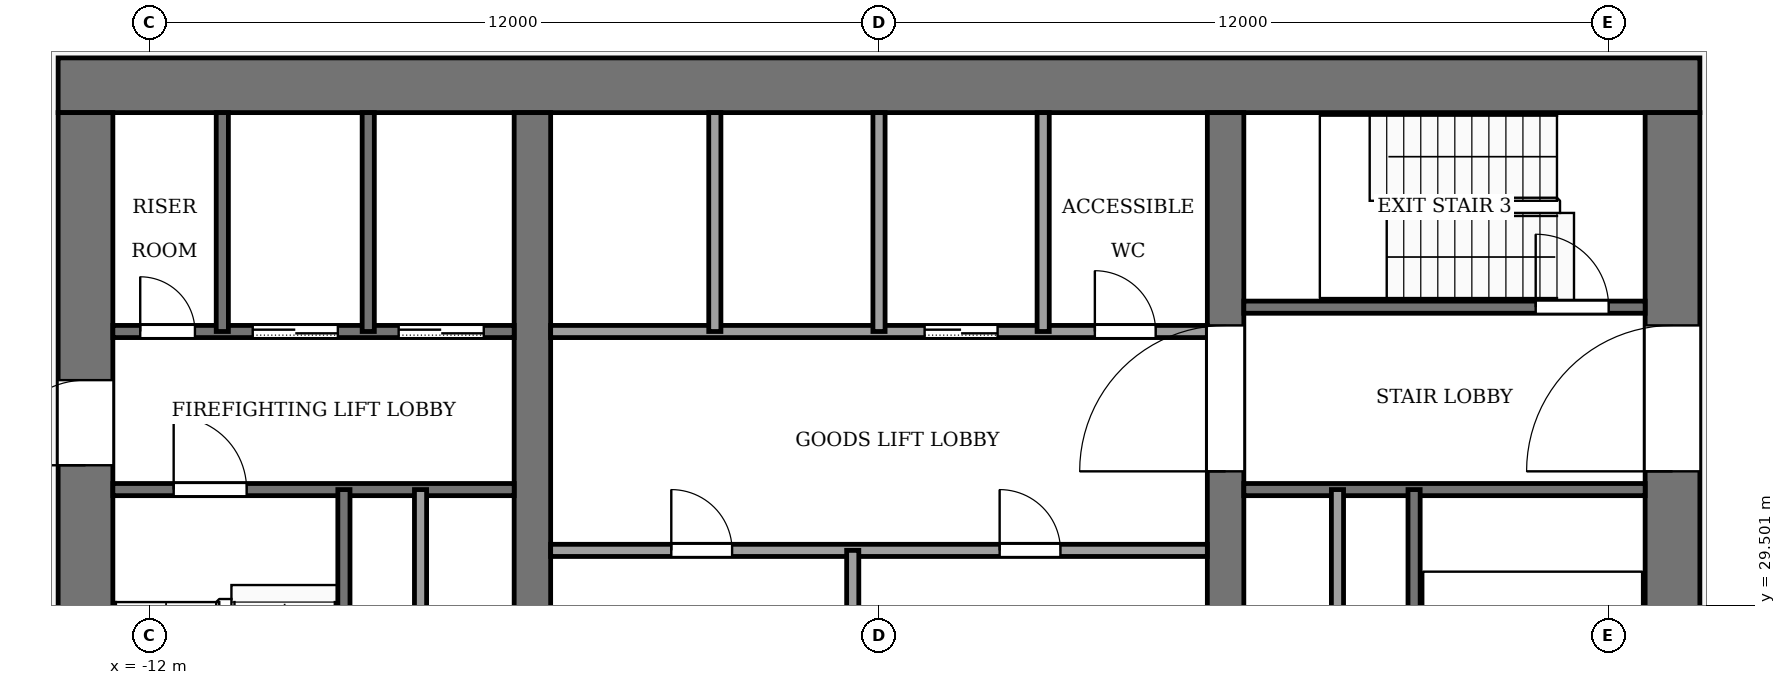
"""IFC4 building model, lengths in metres.
Left out: names, types, materials, properties, quantities, classifications, styles, units other than length and angle.
Written with IfcOpenShell. Run it as: python <this file> out.ifc"""

import sys

from ifc_helpers import new_model, si_unit, direction, frame, frame_2d, origin, place, context, subcontext, project, spatial, rectangle, extrude, element, fill, save


model = new_model("IFC4")
c1 = context("Model", 3, precision=1e-05, world=origin(), true_north=direction((0.0, 1.0)))
c2 = subcontext(c1, "Body", "Model", "MODEL_VIEW")
j1 = project(units=[si_unit("LENGTHUNIT", "METRE"), si_unit("PLANEANGLEUNIT", "RADIAN")], contexts=[c1])
p1 = place(None, origin())
s1 = spatial("IfcSite", under=j1, at=p1, CompositionType="ELEMENT")
p2 = place(p1, origin())
s2 = spatial("IfcBuilding", under=s1, at=p2, CompositionType="ELEMENT")
p3 = place(p2, frame((0.0, 0.0, 206.0)))
s3 = spatial("IfcBuildingStorey", under=s2, at=p3, CompositionType="ELEMENT", Elevation=206.0)
p4 = place(p3, frame((-13.5, 38.05, -0.13), z_axis=(0.0, 0.0, 1.0), x_axis=(1.0, 0.0, 0.0)))
e1 = element("IfcWall", 1, at=p4, inside=s3, PredefinedType="SHEAR", context=c2, shape_type="SweptSolid", body=[
    extrude(rectangle(XDim=27.0, YDim=0.9, at=frame_2d((13.5, 0.0))), origin(), (0.0, 0.0, 1.0), 4.0),
])
p5 = place(p3, frame((-13.05, 18.4, -0.13), z_axis=(0.0, 0.0, 1.0), x_axis=(0.0, 1.0, 0.0)))
e2 = element("IfcWall", 2, at=p5, inside=s3, PredefinedType="SHEAR", context=c2, shape_type="SweptSolid", body=[
    extrude(rectangle(XDim=19.2, YDim=0.9, at=frame_2d((9.6, 0.0))), origin(), (0.0, 0.0, 1.0), 4.0),
])
p6 = place(p5, frame((2.8, 0.0, 0.13)))
e3 = element("IfcOpeningElement", 3, at=p6, cuts=e2, PredefinedType="OPENING", context=c2, shape_type="SweptSolid", body=[
    extrude(rectangle(XDim=2.4, YDim=2.4, at=frame_2d((1.2, 1.2))), frame((0.0, 0.46, 0.0), z_axis=(0.0, -1.0, 0.0), x_axis=(1.0, 0.0, 0.0)), (0.0, 0.0, 1.0), 0.92),
])
p7 = place(p5, frame((13.4, 0.0, 0.13)))
e4 = element("IfcOpeningElement", 4, at=p7, cuts=e2, PredefinedType="OPENING", context=c2, shape_type="SweptSolid", body=[
    extrude(rectangle(XDim=1.4, YDim=2.2, at=frame_2d((0.7, 1.1))), frame((0.0, 0.46, 0.0), z_axis=(0.0, -1.0, 0.0), x_axis=(1.0, 0.0, 0.0)), (0.0, 0.0, 1.0), 0.92),
])
p8 = place(p3, frame((13.05, 18.4, -0.13), z_axis=(0.0, 0.0, 1.0), x_axis=(0.0, 1.0, 0.0)))
e5 = element("IfcWall", 5, at=p8, inside=s3, PredefinedType="SHEAR", context=c2, shape_type="SweptSolid", body=[
    extrude(rectangle(XDim=19.2, YDim=0.9, at=frame_2d((9.6, 0.0))), origin(), (0.0, 0.0, 1.0), 4.0),
])
p9 = place(p8, frame((2.8, 0.0, 0.13)))
e6 = element("IfcOpeningElement", 6, at=p9, cuts=e5, PredefinedType="OPENING", context=c2, shape_type="SweptSolid", body=[
    extrude(rectangle(XDim=2.4, YDim=2.4, at=frame_2d((1.2, 1.2))), frame((0.0, 0.46, 0.0), z_axis=(0.0, -1.0, 0.0), x_axis=(1.0, 0.0, 0.0)), (0.0, 0.0, 1.0), 0.92),
])
p10 = place(p8, frame((13.3, 0.0, 0.13)))
e7 = element("IfcOpeningElement", 7, at=p10, cuts=e5, PredefinedType="OPENING", context=c2, shape_type="SweptSolid", body=[
    extrude(rectangle(XDim=2.4, YDim=2.4, at=frame_2d((1.2, 1.2))), frame((0.0, 0.46, 0.0), z_axis=(0.0, -1.0, 0.0), x_axis=(1.0, 0.0, 0.0)), (0.0, 0.0, 1.0), 0.92),
])
p11 = place(p3, frame((-5.7, 18.4, -0.13), z_axis=(0.0, 0.0, 1.0), x_axis=(0.0, 1.0, 0.0)))
e8 = element("IfcWall", 8, at=p11, inside=s3, PredefinedType="SHEAR", context=c2, shape_type="SweptSolid", body=[
    extrude(rectangle(XDim=19.2, YDim=0.6, at=frame_2d((9.6, 0.0))), origin(), (0.0, 0.0, 1.0), 4.0),
])
p12 = place(p11, frame((8.35, 0.0, 0.13)))
e9 = element("IfcOpeningElement", 9, at=p12, cuts=e8, PredefinedType="OPENING", context=c2, shape_type="SweptSolid", body=[
    extrude(rectangle(XDim=0.9, YDim=2.1, at=frame_2d((0.45, 1.05))), frame((0.0, 0.31, 0.0), z_axis=(0.0, -1.0, 0.0), x_axis=(1.0, 0.0, 0.0)), (0.0, 0.0, 1.0), 0.62),
])
p13 = place(p3, frame((5.7, 18.4, -0.13), z_axis=(0.0, 0.0, 1.0), x_axis=(0.0, 1.0, 0.0)))
e10 = element("IfcWall", 10, at=p13, inside=s3, PredefinedType="SHEAR", context=c2, shape_type="SweptSolid", body=[
    extrude(rectangle(XDim=19.2, YDim=0.6, at=frame_2d((9.6, 0.0))), origin(), (0.0, 0.0, 1.0), 4.0),
])
p14 = place(p13, frame((8.35, 0.0, 0.13)))
e11 = element("IfcOpeningElement", 11, at=p14, cuts=e10, PredefinedType="OPENING", context=c2, shape_type="SweptSolid", body=[
    extrude(rectangle(XDim=0.9, YDim=2.1, at=frame_2d((0.45, 1.05))), frame((0.0, 0.31, 0.0), z_axis=(0.0, -1.0, 0.0), x_axis=(1.0, 0.0, 0.0)), (0.0, 0.0, 1.0), 0.62),
])
p15 = place(p13, frame((13.3, 0.0, 0.13)))
e12 = element("IfcOpeningElement", 12, at=p15, cuts=e10, PredefinedType="OPENING", context=c2, shape_type="SweptSolid", body=[
    extrude(rectangle(XDim=2.4, YDim=2.4, at=frame_2d((1.2, 1.2))), frame((0.0, 0.31, 0.0), z_axis=(0.0, -1.0, 0.0), x_axis=(1.0, 0.0, 0.0)), (0.0, 0.0, 1.0), 0.62),
])
p16 = place(p3, frame((-5.4, 30.4, 0.0), z_axis=(0.0, 0.0, 1.0), x_axis=(1.0, 0.0, 0.0)))
e13 = element("IfcWall", 13, at=p16, inside=s3, PredefinedType="PARTITIONING", context=c2, shape_type="SweptSolid", body=[
    extrude(rectangle(XDim=10.8, YDim=0.2, at=frame_2d((5.4, 0.0))), origin(), (0.0, 0.0, 1.0), 3.87),
])
p17 = place(p16, frame((1.984, 0.0, 0.0)))
e14 = element("IfcOpeningElement", 14, at=p17, cuts=e13, PredefinedType="OPENING", context=c2, shape_type="SweptSolid", body=[
    extrude(rectangle(XDim=1.0, YDim=2.1, at=frame_2d((0.5, 1.05))), frame((0.0, 0.11, 0.0), z_axis=(0.0, -1.0, 0.0), x_axis=(1.0, 0.0, 0.0)), (0.0, 0.0, 1.0), 0.22),
])
p18 = place(p16, frame((7.384, 0.0, 0.0)))
e15 = element("IfcOpeningElement", 15, at=p18, cuts=e13, PredefinedType="OPENING", context=c2, shape_type="SweptSolid", body=[
    extrude(rectangle(XDim=1.0, YDim=2.1, at=frame_2d((0.5, 1.05))), frame((0.0, 0.11, 0.0), z_axis=(0.0, -1.0, 0.0), x_axis=(1.0, 0.0, 0.0)), (0.0, 0.0, 1.0), 0.22),
])
p19 = place(p3, frame((-12.6, 31.4, 0.0), z_axis=(0.0, 0.0, 1.0), x_axis=(1.0, 0.0, 0.0)))
e16 = element("IfcWall", 16, at=p19, inside=s3, PredefinedType="PARTITIONING", context=c2, shape_type="SweptSolid", body=[
    extrude(rectangle(XDim=6.6, YDim=0.2, at=frame_2d((3.3, 0.0))), origin(), (0.0, 0.0, 1.0), 3.87),
])
p20 = place(p19, frame((1.0, 0.0, 0.0)))
e17 = element("IfcOpeningElement", 17, at=p20, cuts=e16, PredefinedType="OPENING", context=c2, shape_type="SweptSolid", body=[
    extrude(rectangle(XDim=1.2, YDim=2.2, at=frame_2d((0.6, 1.1))), frame((0.0, 0.11, 0.0), z_axis=(0.0, -1.0, 0.0), x_axis=(1.0, 0.0, 0.0)), (0.0, 0.0, 1.0), 0.22),
])
p21 = place(p3, frame((6.0, 31.4, 0.0), z_axis=(0.0, 0.0, 1.0), x_axis=(1.0, 0.0, 0.0)))
e18 = element("IfcWall", 18, at=p21, inside=s3, PredefinedType="PARTITIONING", context=c2, shape_type="SweptSolid", body=[
    extrude(rectangle(XDim=6.6, YDim=0.2, at=frame_2d((3.3, 0.0))), origin(), (0.0, 0.0, 1.0), 3.87),
])
p22 = place(p3, frame((-12.6, 34.0, 0.0), z_axis=(0.0, 0.0, 1.0), x_axis=(1.0, 0.0, 0.0)))
e19 = element("IfcWall", 19, at=p22, inside=s3, PredefinedType="PARTITIONING", context=c2, shape_type="SweptSolid", body=[
    extrude(rectangle(XDim=6.6, YDim=0.2, at=frame_2d((3.3, 0.0))), origin(), (0.0, 0.0, 1.0), 3.87),
])
p23 = place(p22, frame((4.7, 0.0, 0.0)))
e20 = element("IfcOpeningElement", 20, at=p23, cuts=e19, PredefinedType="OPENING", context=c2, shape_type="SweptSolid", body=[
    extrude(rectangle(XDim=1.4, YDim=2.2, at=frame_2d((0.7, 1.1))), frame((0.0, 0.11, 0.0), z_axis=(0.0, -1.0, 0.0), x_axis=(1.0, 0.0, 0.0)), (0.0, 0.0, 1.0), 0.22),
])
p24 = place(p22, frame((2.3, 0.0, 0.0)))
e21 = element("IfcOpeningElement", 21, at=p24, cuts=e19, PredefinedType="OPENING", context=c2, shape_type="SweptSolid", body=[
    extrude(rectangle(XDim=1.4, YDim=2.2, at=frame_2d((0.7, 1.1))), frame((0.0, 0.11, 0.0), z_axis=(0.0, -1.0, 0.0), x_axis=(1.0, 0.0, 0.0)), (0.0, 0.0, 1.0), 0.22),
])
p25 = place(p22, frame((0.45, 0.0, 0.0)))
e22 = element("IfcOpeningElement", 22, at=p25, cuts=e19, PredefinedType="OPENING", context=c2, shape_type="SweptSolid", body=[
    extrude(rectangle(XDim=0.9, YDim=2.1, at=frame_2d((0.45, 1.05))), frame((0.0, 0.11, 0.0), z_axis=(0.0, -1.0, 0.0), x_axis=(1.0, 0.0, 0.0)), (0.0, 0.0, 1.0), 0.22),
])
p26 = place(p3, frame((-5.4, 34.0, 0.0), z_axis=(0.0, 0.0, 1.0), x_axis=(1.0, 0.0, 0.0)))
e23 = element("IfcWall", 23, at=p26, inside=s3, PredefinedType="PARTITIONING", context=c2, shape_type="SweptSolid", body=[
    extrude(rectangle(XDim=10.8, YDim=0.2, at=frame_2d((5.4, 0.0))), origin(), (0.0, 0.0, 1.0), 3.87),
])
p27 = place(p26, frame((6.15, 0.0, 0.0)))
e24 = element("IfcOpeningElement", 24, at=p27, cuts=e23, PredefinedType="OPENING", context=c2, shape_type="SweptSolid", body=[
    extrude(rectangle(XDim=1.2, YDim=2.2, at=frame_2d((0.6, 1.1))), frame((0.0, 0.11, 0.0), z_axis=(0.0, -1.0, 0.0), x_axis=(1.0, 0.0, 0.0)), (0.0, 0.0, 1.0), 0.22),
])
p28 = place(p26, frame((8.95, 0.0, 0.0)))
e25 = element("IfcOpeningElement", 25, at=p28, cuts=e23, PredefinedType="OPENING", context=c2, shape_type="SweptSolid", body=[
    extrude(rectangle(XDim=1.0, YDim=2.1, at=frame_2d((0.5, 1.05))), frame((0.0, 0.11, 0.0), z_axis=(0.0, -1.0, 0.0), x_axis=(1.0, 0.0, 0.0)), (0.0, 0.0, 1.0), 0.22),
])
p29 = place(p3, frame((6.0, 34.4, 0.0), z_axis=(0.0, 0.0, 1.0), x_axis=(1.0, 0.0, 0.0)))
e26 = element("IfcWall", 26, at=p29, inside=s3, PredefinedType="PARTITIONING", context=c2, shape_type="SweptSolid", body=[
    extrude(rectangle(XDim=6.6, YDim=0.2, at=frame_2d((3.3, 0.0))), origin(), (0.0, 0.0, 1.0), 3.87),
])
p30 = place(p29, frame((4.8, 0.0, 0.0)))
e27 = element("IfcOpeningElement", 27, at=p30, cuts=e26, PredefinedType="OPENING", context=c2, shape_type="SweptSolid", body=[
    extrude(rectangle(XDim=1.2, YDim=2.2, at=frame_2d((0.6, 1.1))), frame((0.0, 0.11, 0.0), z_axis=(0.0, -1.0, 0.0), x_axis=(1.0, 0.0, 0.0)), (0.0, 0.0, 1.0), 0.22),
])
p31 = place(p3, frame((-10.8, 34.0, 0.0), z_axis=(0.0, 0.0, 1.0), x_axis=(0.0, 1.0, 0.0)))
e28 = element("IfcWall", 28, at=p31, inside=s3, PredefinedType="PARTITIONING", context=c2, shape_type="SweptSolid", body=[
    extrude(rectangle(XDim=3.6, YDim=0.2, at=frame_2d((1.8, 0.0))), origin(), (0.0, 0.0, 1.0), 3.87),
])
p32 = place(p3, frame((-8.8, 24.0, 0.0), z_axis=(0.0, 0.0, 1.0), x_axis=(0.0, 1.0, 0.0)))
e29 = element("IfcWall", 29, at=p32, inside=s3, PredefinedType="PARTITIONING", context=c2, shape_type="SweptSolid", body=[
    extrude(rectangle(XDim=7.4, YDim=0.2, at=frame_2d((3.7, 0.0))), origin(), (0.0, 0.0, 1.0), 3.87),
])
p33 = place(p3, frame((-8.4, 34.0, 0.0), z_axis=(0.0, 0.0, 1.0), x_axis=(0.0, 1.0, 0.0)))
e30 = element("IfcWall", 30, at=p33, inside=s3, PredefinedType="PARTITIONING", context=c2, shape_type="SweptSolid", body=[
    extrude(rectangle(XDim=3.6, YDim=0.2, at=frame_2d((1.8, 0.0))), origin(), (0.0, 0.0, 1.0), 3.87),
])
p34 = place(p3, frame((-7.54, 24.0, 0.0), z_axis=(0.0, 0.0, 1.0), x_axis=(0.0, 1.0, 0.0)))
e31 = element("IfcWall", 31, at=p34, inside=s3, PredefinedType="PARTITIONING", context=c2, shape_type="SweptSolid", body=[
    extrude(rectangle(XDim=7.4, YDim=0.2, at=frame_2d((3.7, 0.0))), origin(), (0.0, 0.0, 1.0), 3.87),
])
p35 = place(p3, frame((-2.7, 34.0, 0.0), z_axis=(0.0, 0.0, 1.0), x_axis=(0.0, 1.0, 0.0)))
e32 = element("IfcWall", 32, at=p35, inside=s3, PredefinedType="PARTITIONING", context=c2, shape_type="SweptSolid", body=[
    extrude(rectangle(XDim=3.6, YDim=0.2, at=frame_2d((1.8, 0.0))), origin(), (0.0, 0.0, 1.0), 3.87),
])
p36 = place(p3, frame((-0.432, 28.0, 0.0), z_axis=(0.0, 0.0, 1.0), x_axis=(0.0, 1.0, 0.0)))
e33 = element("IfcWall", 33, at=p36, inside=s3, PredefinedType="PARTITIONING", context=c2, shape_type="SweptSolid", body=[
    extrude(rectangle(XDim=2.4, YDim=0.2, at=frame_2d((1.2, 0.0))), origin(), (0.0, 0.0, 1.0), 3.87),
])
for number, where, z_axis, x_axis in (
    (34, (0.0, 34.0, 0.0), (0.0, 0.0, 1.0), (0.0, 1.0, 0.0)),
    (35, (2.7, 34.0, 0.0), (0.0, 0.0, 1.0), (0.0, 1.0, 0.0)),
):
    element("IfcWall", number, at=place(p3, frame(where, z_axis=z_axis, x_axis=x_axis)), inside=s3, PredefinedType="PARTITIONING", context=c2, shape_type="SweptSolid", body=[
        extrude(rectangle(XDim=3.6, YDim=0.2, at=frame_2d((1.8, 0.0))), origin(), (0.0, 0.0, 1.0), 3.87),
    ])
for number, where, z_axis, x_axis in (
    (36, (7.54, 24.0, 0.0), (0.0, 0.0, 1.0), (0.0, 1.0, 0.0)),
    (37, (8.8, 24.0, 0.0), (0.0, 0.0, 1.0), (0.0, 1.0, 0.0)),
):
    element("IfcWall", number, at=place(p3, frame(where, z_axis=z_axis, x_axis=x_axis)), inside=s3, PredefinedType="PARTITIONING", context=c2, shape_type="SweptSolid", body=[
        extrude(rectangle(XDim=7.4, YDim=0.2, at=frame_2d((3.7, 0.0))), origin(), (0.0, 0.0, 1.0), 3.87),
    ])
p37 = place(p27, origin())
e38 = element("IfcDoor", 38, at=p37, inside=s3, OperationType="SLIDING_TO_LEFT", PredefinedType="DOOR", context=c2, shape_type="SweptSolid", body=[
    extrude(rectangle(XDim=1.2, YDim=2.2, at=frame_2d((0.6, 1.1))), frame((0.0, 0.025, 0.0), z_axis=(0.0, -1.0, 0.0), x_axis=(1.0, 0.0, 0.0)), (0.0, 0.0, 1.0), 0.05),
])
fill(e24, e38)
p38 = place(p23, origin())
e39 = element("IfcDoor", 39, at=p38, inside=s3, OperationType="SLIDING_TO_LEFT", PredefinedType="DOOR", context=c2, shape_type="SweptSolid", body=[
    extrude(rectangle(XDim=1.4, YDim=2.2, at=frame_2d((0.7, 1.1))), frame((0.0, 0.025, 0.0), z_axis=(0.0, -1.0, 0.0), x_axis=(1.0, 0.0, 0.0)), (0.0, 0.0, 1.0), 0.05),
])
fill(e20, e39)
p39 = place(p24, origin())
e40 = element("IfcDoor", 40, at=p39, inside=s3, OperationType="SLIDING_TO_LEFT", PredefinedType="DOOR", context=c2, shape_type="SweptSolid", body=[
    extrude(rectangle(XDim=1.4, YDim=2.2, at=frame_2d((0.7, 1.1))), frame((0.0, 0.025, 0.0), z_axis=(0.0, -1.0, 0.0), x_axis=(1.0, 0.0, 0.0)), (0.0, 0.0, 1.0), 0.05),
])
fill(e21, e40)
p40 = place(p25, origin())
e41 = element("IfcDoor", 41, at=p40, inside=s3, OperationType="SINGLE_SWING_RIGHT", PredefinedType="DOOR", context=c2, shape_type="SweptSolid", body=[
    extrude(rectangle(XDim=0.9, YDim=2.1, at=frame_2d((0.45, 1.05))), frame((0.0, 0.025, 0.0), z_axis=(0.0, -1.0, 0.0), x_axis=(1.0, 0.0, 0.0)), (0.0, 0.0, 1.0), 0.05),
])
fill(e22, e41)
p41 = place(p17, origin())
e42 = element("IfcDoor", 42, at=p41, inside=s3, OperationType="SINGLE_SWING_LEFT", PredefinedType="DOOR", context=c2, shape_type="SweptSolid", body=[
    extrude(rectangle(XDim=1.0, YDim=2.1, at=frame_2d((0.5, 1.05))), frame((0.0, 0.025, 0.0), z_axis=(0.0, -1.0, 0.0), x_axis=(1.0, 0.0, 0.0)), (0.0, 0.0, 1.0), 0.05),
])
fill(e14, e42)
p42 = place(p18, origin())
e43 = element("IfcDoor", 43, at=p42, inside=s3, OperationType="SINGLE_SWING_RIGHT", PredefinedType="DOOR", context=c2, shape_type="SweptSolid", body=[
    extrude(rectangle(XDim=1.0, YDim=2.1, at=frame_2d((0.5, 1.05))), frame((0.0, 0.025, 0.0), z_axis=(0.0, -1.0, 0.0), x_axis=(1.0, 0.0, 0.0)), (0.0, 0.0, 1.0), 0.05),
])
fill(e15, e43)
p43 = place(p28, origin())
e44 = element("IfcDoor", 44, at=p43, inside=s3, OperationType="SINGLE_SWING_LEFT", PredefinedType="DOOR", context=c2, shape_type="SweptSolid", body=[
    extrude(rectangle(XDim=1.0, YDim=2.1, at=frame_2d((0.5, 1.05))), frame((0.0, 0.025, 0.0), z_axis=(0.0, -1.0, 0.0), x_axis=(1.0, 0.0, 0.0)), (0.0, 0.0, 1.0), 0.05),
])
fill(e25, e44)
p44 = place(p20, origin())
e45 = element("IfcDoor", 45, at=p44, inside=s3, OperationType="SINGLE_SWING_LEFT", PredefinedType="DOOR", context=c2, shape_type="SweptSolid", body=[
    extrude(rectangle(XDim=1.2, YDim=2.2, at=frame_2d((0.6, 1.1))), frame((0.0, 0.025, 0.0), z_axis=(0.0, -1.0, 0.0), x_axis=(1.0, 0.0, 0.0)), (0.0, 0.0, 1.0), 0.05),
])
fill(e17, e45)
p45 = place(p30, origin())
e46 = element("IfcDoor", 46, at=p45, inside=s3, OperationType="SINGLE_SWING_LEFT", PredefinedType="DOOR", context=c2, shape_type="SweptSolid", body=[
    extrude(rectangle(XDim=1.2, YDim=2.2, at=frame_2d((0.6, 1.1))), frame((0.0, 0.025, 0.0), z_axis=(0.0, -1.0, 0.0), x_axis=(1.0, 0.0, 0.0)), (0.0, 0.0, 1.0), 0.05),
])
fill(e27, e46)
p46 = place(p15, origin())
e47 = element("IfcDoor", 47, at=p46, inside=s3, OperationType="DOUBLE_DOOR_SINGLE_SWING", PredefinedType="DOOR", context=c2, shape_type="SweptSolid", body=[
    extrude(rectangle(XDim=2.4, YDim=2.4, at=frame_2d((1.2, 1.2))), frame((0.0, 0.025, 0.0), z_axis=(0.0, -1.0, 0.0), x_axis=(1.0, 0.0, 0.0)), (0.0, 0.0, 1.0), 0.05),
])
fill(e12, e47)
p47 = place(p10, origin())
e48 = element("IfcDoor", 48, at=p47, inside=s3, OperationType="DOUBLE_DOOR_SINGLE_SWING", PredefinedType="DOOR", context=c2, shape_type="SweptSolid", body=[
    extrude(rectangle(XDim=2.4, YDim=2.4, at=frame_2d((1.2, 1.2))), frame((0.0, 0.025, 0.0), z_axis=(0.0, -1.0, 0.0), x_axis=(1.0, 0.0, 0.0)), (0.0, 0.0, 1.0), 0.05),
])
fill(e7, e48)
p48 = place(p7, origin())
e49 = element("IfcDoor", 49, at=p48, inside=s3, OperationType="SINGLE_SWING_LEFT", PredefinedType="DOOR", context=c2, shape_type="SweptSolid", body=[
    extrude(rectangle(XDim=1.4, YDim=2.2, at=frame_2d((0.7, 1.1))), frame((0.0, 0.025, 0.0), z_axis=(0.0, -1.0, 0.0), x_axis=(1.0, 0.0, 0.0)), (0.0, 0.0, 1.0), 0.05),
])
fill(e4, e49)
save(model, sys.argv[1])
